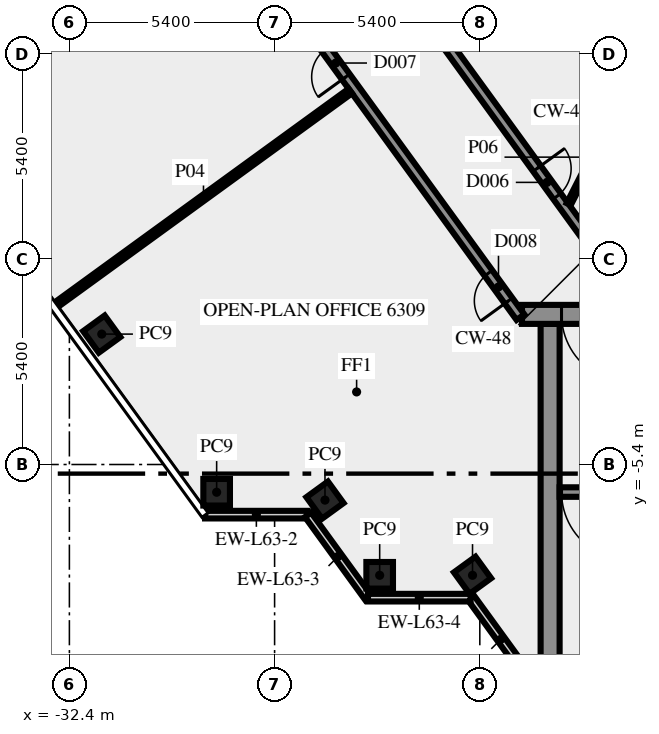
"""IFC4 building model, lengths in metres.
Left out: names, types, materials, properties, quantities, classifications, styles, units other than length and angle.
Written with IfcOpenShell. Run it as: python <this file> out.ifc"""

import sys

from ifc_helpers import new_model, si_unit, direction, frame, frame_2d, origin, origin_2d, place, context, subcontext, project, spatial, rectangle, extrude, element, fill, save


model = new_model("IFC4")
c1 = context("Model", 3, precision=1e-05, world=origin(), true_north=direction((0.0, 1.0)))
c2 = subcontext(c1, "Body", "Model", "MODEL_VIEW")
j1 = project(units=[si_unit("LENGTHUNIT", "METRE"), si_unit("PLANEANGLEUNIT", "RADIAN")], contexts=[c1])
p1 = place(None, origin())
s1 = spatial("IfcSite", under=j1, at=p1, CompositionType="ELEMENT")
p2 = place(p1, origin())
s2 = spatial("IfcBuilding", under=s1, at=p2, CompositionType="ELEMENT")
p3 = place(p2, frame((0.0, 0.0, 269.0)))
s3 = spatial("IfcBuildingStorey", under=s2, at=p3, CompositionType="ELEMENT", Elevation=269.0)
for number, where, z_axis, x_axis in (
    (1, (-31.548, -1.969, 0.0), (0.0, 0.0, 1.0), (0.588, -0.809, 0.0)),
    (2, (-28.525, -6.13, 0.0), (0.0, 0.0, 1.0), (1.0, 0.0, 0.0)),
    (3, (-25.674, -6.337, 0.0), (0.0, 0.0, 1.0), (0.588, -0.809, 0.0)),
    (4, (-24.235, -8.315, 0.0), (0.0, 0.0, 1.0), (1.0, 0.0, 0.0)),
    (5, (-21.792, -8.315, 0.0), (0.0, 0.0, 1.0), (0.588, -0.809, 0.0)),
):
    element("IfcColumn", number, at=place(p3, frame(where, z_axis=z_axis, x_axis=x_axis)), inside=s3, PredefinedType="COLUMN", context=c2, shape_type="SweptSolid", body=[
        extrude(rectangle(XDim=0.7, YDim=0.7, at=origin_2d()), origin(), (0.0, 0.0, 1.0), 3.5),
    ])
p4 = place(p3, frame((-21.833, -8.909, 0.0), z_axis=(0.0, 0.0, 1.0), x_axis=(0.587766567315, -0.809030569476, 0.0)))
e6 = element("IfcWall", 6, at=p4, inside=s3, PredefinedType="SOLIDWALL", context=c2, shape_type="SweptSolid", body=[
    extrude(rectangle(XDim=2.688, YDim=0.2, at=frame_2d((1.344, 0.0))), origin(), (0.0, 0.0, 1.0), 3.5),
])
p5 = place(p3, frame((-28.83, -6.719, 0.0), z_axis=(0.0, 0.0, 1.0), x_axis=(1.0, 0.0, 0.0)))
e7 = element("IfcWall", 7, at=p5, inside=s3, PredefinedType="SOLIDWALL", context=c2, shape_type="SweptSolid", body=[
    extrude(rectangle(XDim=2.7, YDim=0.2, at=frame_2d((1.35, 0.0))), origin(), (0.0, 0.0, 1.0), 3.5),
])
p6 = place(p3, frame((-26.12, -6.724, 0.0), z_axis=(0.0, 0.0, 1.0), x_axis=(0.587720002413, -0.809064397168, 0.0)))
e8 = element("IfcWall", 8, at=p6, inside=s3, PredefinedType="SOLIDWALL", context=c2, shape_type="SweptSolid", body=[
    extrude(rectangle(XDim=2.7, YDim=0.2, at=frame_2d((1.35, 0.0))), origin(), (0.0, 0.0, 1.0), 3.5),
])
p7 = place(p3, frame((-24.543, -8.904, 0.0), z_axis=(0.0, 0.0, 1.0), x_axis=(1.0, 0.0, 0.0)))
e9 = element("IfcWall", 9, at=p7, inside=s3, PredefinedType="SOLIDWALL", context=c2, shape_type="SweptSolid", body=[
    extrude(rectangle(XDim=2.7, YDim=0.2, at=frame_2d((1.35, 0.0))), origin(), (0.0, 0.0, 1.0), 3.5),
])
p8 = place(p3, frame((-19.75, -10.5, 0.0), z_axis=(0.0, 0.0, 1.0), x_axis=(0.0, 1.0, 0.0)))
e10 = element("IfcWall", 10, at=p8, inside=s3, PredefinedType="SHEAR", context=c2, shape_type="SweptSolid", body=[
    extrude(rectangle(XDim=8.8, YDim=0.5, at=frame_2d((4.4, 0.0))), origin(), (0.0, 0.0, 1.0), 3.5),
])
p9 = place(p3, frame((-11.45, -6.125, 0.0), z_axis=(0.0, 0.0, 1.0), x_axis=(-1.0, 0.0, 0.0)))
e11 = element("IfcWall", 11, at=p9, inside=s3, PredefinedType="SHEAR", context=c2, shape_type="SweptSolid", body=[
    extrude(rectangle(XDim=8.05, YDim=0.25, at=frame_2d((4.025, 0.0))), origin(), (0.0, 0.0, 1.0), 3.5),
])
p10 = place(p9, frame((6.2, 0.0, 0.0)))
e12 = element("IfcOpeningElement", 12, at=p10, cuts=e11, PredefinedType="OPENING", context=c2, shape_type="SweptSolid", body=[
    extrude(rectangle(XDim=1.8, YDim=2.1, at=frame_2d((0.9, 1.05))), frame((0.0, 0.135, 0.0), z_axis=(0.0, -1.0, 0.0), x_axis=(1.0, 0.0, 0.0)), (0.0, 0.0, 1.0), 0.27),
])
p11 = place(p3, frame((20.49, -1.45, 0.0), z_axis=(0.0, 0.0, 1.0), x_axis=(-1.0, 0.0, 0.0)))
e13 = element("IfcWall", 13, at=p11, inside=s3, PredefinedType="SHEAR", context=c2, shape_type="SweptSolid", body=[
    extrude(rectangle(XDim=40.98, YDim=0.5, at=frame_2d((20.49, 0.0))), origin(), (0.0, 0.0, 1.0), 3.5),
])
p12 = place(p11, frame((38.14, 0.0, 0.0)))
e14 = element("IfcOpeningElement", 14, at=p12, cuts=e13, PredefinedType="OPENING", context=c2, shape_type="SweptSolid", body=[
    extrude(rectangle(XDim=1.8, YDim=2.1, at=frame_2d((0.9, 1.05))), frame((0.0, 0.26, 0.0), z_axis=(0.0, -1.0, 0.0), x_axis=(1.0, 0.0, 0.0)), (0.0, 0.0, 1.0), 0.52),
])
p13 = place(p11, frame((36.728, 0.0, 0.0)))
e15 = element("IfcOpeningElement", 15, at=p13, cuts=e13, PredefinedType="OPENING", context=c2, shape_type="SweptSolid", body=[
    extrude(rectangle(XDim=0.8, YDim=2.1, at=frame_2d((0.4, 1.05))), frame((0.0, 0.26, 0.0), z_axis=(0.0, -1.0, 0.0), x_axis=(1.0, 0.0, 0.0)), (0.0, 0.0, 1.0), 0.52),
])
p14 = place(p11, frame((35.153, 0.0, 0.0)))
e16 = element("IfcOpeningElement", 16, at=p14, cuts=e13, PredefinedType="OPENING", context=c2, shape_type="SweptSolid", body=[
    extrude(rectangle(XDim=0.8, YDim=2.1, at=frame_2d((0.4, 1.05))), frame((0.0, 0.26, 0.0), z_axis=(0.0, -1.0, 0.0), x_axis=(1.0, 0.0, 0.0)), (0.0, 0.0, 1.0), 0.52),
])
p15 = place(p11, frame((32.94, 0.0, 0.0)))
e17 = element("IfcOpeningElement", 17, at=p15, cuts=e13, PredefinedType="OPENING", context=c2, shape_type="SweptSolid", body=[
    extrude(rectangle(XDim=0.9, YDim=2.1, at=frame_2d((0.45, 1.05))), frame((0.0, 0.26, 0.0), z_axis=(0.0, -1.0, 0.0), x_axis=(1.0, 0.0, 0.0)), (0.0, 0.0, 1.0), 0.52),
])
p16 = place(p11, frame((31.015, 0.0, 0.0)))
e18 = element("IfcOpeningElement", 18, at=p16, cuts=e13, PredefinedType="OPENING", context=c2, shape_type="SweptSolid", body=[
    extrude(rectangle(XDim=0.8, YDim=2.1, at=frame_2d((0.4, 1.05))), frame((0.0, 0.26, 0.0), z_axis=(0.0, -1.0, 0.0), x_axis=(1.0, 0.0, 0.0)), (0.0, 0.0, 1.0), 0.52),
])
p17 = place(p11, frame((24.765, 0.0, 0.0)))
e19 = element("IfcOpeningElement", 19, at=p17, cuts=e13, PredefinedType="OPENING", context=c2, shape_type="SweptSolid", body=[
    extrude(rectangle(XDim=0.8, YDim=2.1, at=frame_2d((0.4, 1.05))), frame((0.0, 0.26, 0.0), z_axis=(0.0, -1.0, 0.0), x_axis=(1.0, 0.0, 0.0)), (0.0, 0.0, 1.0), 0.52),
])
p18 = place(p11, frame((19.59, 0.0, 0.0)))
e20 = element("IfcOpeningElement", 20, at=p18, cuts=e13, PredefinedType="OPENING", context=c2, shape_type="SweptSolid", body=[
    extrude(rectangle(XDim=2.0, YDim=2.1, at=frame_2d((1.0, 1.05))), frame((0.0, 0.26, 0.0), z_axis=(0.0, -1.0, 0.0), x_axis=(1.0, 0.0, 0.0)), (0.0, 0.0, 1.0), 0.52),
])
p19 = place(p11, frame((13.202, 0.0, 0.0)))
e21 = element("IfcOpeningElement", 21, at=p19, cuts=e13, PredefinedType="OPENING", context=c2, shape_type="SweptSolid", body=[
    extrude(rectangle(XDim=0.9, YDim=2.1, at=frame_2d((0.45, 1.05))), frame((0.0, 0.26, 0.0), z_axis=(0.0, -1.0, 0.0), x_axis=(1.0, 0.0, 0.0)), (0.0, 0.0, 1.0), 0.52),
])
p20 = place(p11, frame((9.478, 0.0, 0.0)))
e22 = element("IfcOpeningElement", 22, at=p20, cuts=e13, PredefinedType="OPENING", context=c2, shape_type="SweptSolid", body=[
    extrude(rectangle(XDim=0.9, YDim=2.1, at=frame_2d((0.45, 1.05))), frame((0.0, 0.26, 0.0), z_axis=(0.0, -1.0, 0.0), x_axis=(1.0, 0.0, 0.0)), (0.0, 0.0, 1.0), 0.52),
])
p21 = place(p11, frame((7.14, 0.0, 0.0)))
e23 = element("IfcOpeningElement", 23, at=p21, cuts=e13, PredefinedType="OPENING", context=c2, shape_type="SweptSolid", body=[
    extrude(rectangle(XDim=0.9, YDim=2.1, at=frame_2d((0.45, 1.05))), frame((0.0, 0.26, 0.0), z_axis=(0.0, -1.0, 0.0), x_axis=(1.0, 0.0, 0.0)), (0.0, 0.0, 1.0), 0.52),
])
p22 = place(p11, frame((4.19, 0.0, 0.0)))
e24 = element("IfcOpeningElement", 24, at=p22, cuts=e13, PredefinedType="OPENING", context=c2, shape_type="SweptSolid", body=[
    extrude(rectangle(XDim=0.9, YDim=2.1, at=frame_2d((0.45, 1.05))), frame((0.0, 0.26, 0.0), z_axis=(0.0, -1.0, 0.0), x_axis=(1.0, 0.0, 0.0)), (0.0, 0.0, 1.0), 0.52),
])
p23 = place(p11, frame((1.04, 0.0, 0.0)))
e25 = element("IfcOpeningElement", 25, at=p23, cuts=e13, PredefinedType="OPENING", context=c2, shape_type="SweptSolid", body=[
    extrude(rectangle(XDim=1.8, YDim=2.1, at=frame_2d((0.9, 1.05))), frame((0.0, 0.26, 0.0), z_axis=(0.0, -1.0, 0.0), x_axis=(1.0, 0.0, 0.0)), (0.0, 0.0, 1.0), 0.52),
])
p24 = place(p3, frame((-20.531, -1.523, 0.0), z_axis=(0.0, 0.0, 1.0), x_axis=(-0.587786711753, 0.809015934013, 0.0)))
e26 = element("IfcWall", 26, at=p24, inside=s3, PredefinedType="SOLIDWALL", context=c2, shape_type="SweptSolid", body=[
    extrude(rectangle(XDim=21.911, YDim=0.25, at=frame_2d((10.956, 0.0))), origin(), (0.0, 0.0, 1.0), 3.5),
])
p25 = place(p24, frame((0.533, 0.0, 0.0)))
e27 = element("IfcOpeningElement", 27, at=p25, cuts=e26, PredefinedType="OPENING", context=c2, shape_type="SweptSolid", body=[
    extrude(rectangle(XDim=0.9, YDim=2.1, at=frame_2d((0.45, 1.05))), frame((0.0, 0.135, 0.0), z_axis=(0.0, -1.0, 0.0), x_axis=(1.0, 0.0, 0.0)), (0.0, 0.0, 1.0), 0.27),
])
p26 = place(p24, frame((7.816, 0.0, 0.0)))
e28 = element("IfcOpeningElement", 28, at=p26, cuts=e26, PredefinedType="OPENING", context=c2, shape_type="SweptSolid", body=[
    extrude(rectangle(XDim=0.9, YDim=2.1, at=frame_2d((0.45, 1.05))), frame((0.0, 0.135, 0.0), z_axis=(0.0, -1.0, 0.0), x_axis=(1.0, 0.0, 0.0)), (0.0, 0.0, 1.0), 0.27),
])
p27 = place(p3, frame((-31.267, 17.762, 0.0), z_axis=(0.0, 0.0, 1.0), x_axis=(0.587787966774, -0.809015022181, 0.0)))
e29 = element("IfcWall", 29, at=p27, inside=s3, PredefinedType="SOLIDWALL", context=c2, shape_type="SweptSolid", body=[
    extrude(rectangle(XDim=23.345, YDim=0.25, at=frame_2d((11.672, 0.0))), origin(), (0.0, 0.0, 1.0), 3.5),
])
p28 = place(p27, frame((19.004, 0.0, 0.0)))
e30 = element("IfcOpeningElement", 30, at=p28, cuts=e29, PredefinedType="OPENING", context=c2, shape_type="SweptSolid", body=[
    extrude(rectangle(XDim=0.9, YDim=2.1, at=frame_2d((0.45, 1.05))), frame((0.0, 0.135, 0.0), z_axis=(0.0, -1.0, 0.0), x_axis=(1.0, 0.0, 0.0)), (0.0, 0.0, 1.0), 0.27),
])
p29 = place(p3, frame((-25.008, 4.427, 0.0), z_axis=(0.0, 0.0, 1.0), x_axis=(-0.808994684961, -0.587815957341, 0.0)))
e31 = element("IfcWall", 31, at=p29, inside=s3, PredefinedType="PARTITIONING", context=c2, shape_type="SweptSolid", body=[
    extrude(rectangle(XDim=9.55, YDim=0.15, at=frame_2d((4.775, 0.0))), origin(), (0.0, 0.0, 1.0), 2.8),
])
p30 = place(p3, frame((-19.261, 1.45, 0.0), z_axis=(0.0, 0.0, 1.0), x_axis=(0.453950796792, 0.891026752736, 0.0)))
e32 = element("IfcWall", 32, at=p30, inside=s3, PredefinedType="PARTITIONING", context=c2, shape_type="SweptSolid", body=[
    extrude(rectangle(XDim=2.778, YDim=0.12, at=frame_2d((1.389, 0.0))), origin(), (0.0, 0.0, 1.0), 3.5),
])
p31 = place(p10, origin())
e33 = element("IfcDoor", 33, at=p31, inside=s3, OperationType="DOUBLE_DOOR_SINGLE_SWING", PredefinedType="DOOR", context=c2, shape_type="SweptSolid", body=[
    extrude(rectangle(XDim=1.8, YDim=2.1, at=frame_2d((0.9, 1.05))), frame((0.0, 0.025, 0.0), z_axis=(0.0, -1.0, 0.0), x_axis=(1.0, 0.0, 0.0)), (0.0, 0.0, 1.0), 0.05),
])
fill(e12, e33)
p32 = place(p12, origin())
e34 = element("IfcDoor", 34, at=p32, inside=s3, OperationType="DOUBLE_DOOR_SINGLE_SWING", PredefinedType="DOOR", context=c2, shape_type="SweptSolid", body=[
    extrude(rectangle(XDim=1.8, YDim=2.1, at=frame_2d((0.9, 1.05))), frame((0.0, 0.025, 0.0), z_axis=(0.0, -1.0, 0.0), x_axis=(1.0, 0.0, 0.0)), (0.0, 0.0, 1.0), 0.05),
])
fill(e14, e34)
p33 = place(p28, origin())
e35 = element("IfcDoor", 35, at=p33, inside=s3, OperationType="SINGLE_SWING_RIGHT", PredefinedType="DOOR", context=c2, shape_type="SweptSolid", body=[
    extrude(rectangle(XDim=0.9, YDim=2.1, at=frame_2d((0.45, 1.05))), frame((0.0, 0.025, 0.0), z_axis=(0.0, -1.0, 0.0), x_axis=(1.0, 0.0, 0.0)), (0.0, 0.0, 1.0), 0.05),
])
fill(e30, e35)
p34 = place(p25, origin())
e36 = element("IfcDoor", 36, at=p34, inside=s3, OperationType="SINGLE_SWING_LEFT", PredefinedType="DOOR", context=c2, shape_type="SweptSolid", body=[
    extrude(rectangle(XDim=0.9, YDim=2.1, at=frame_2d((0.45, 1.05))), frame((0.0, 0.025, 0.0), z_axis=(0.0, -1.0, 0.0), x_axis=(1.0, 0.0, 0.0)), (0.0, 0.0, 1.0), 0.05),
])
fill(e27, e36)
p35 = place(p26, origin())
e37 = element("IfcDoor", 37, at=p35, inside=s3, OperationType="SINGLE_SWING_LEFT", PredefinedType="DOOR", context=c2, shape_type="SweptSolid", body=[
    extrude(rectangle(XDim=0.9, YDim=2.1, at=frame_2d((0.45, 1.05))), frame((0.0, 0.025, 0.0), z_axis=(0.0, -1.0, 0.0), x_axis=(1.0, 0.0, 0.0)), (0.0, 0.0, 1.0), 0.05),
])
fill(e28, e37)
save(model, sys.argv[1])
